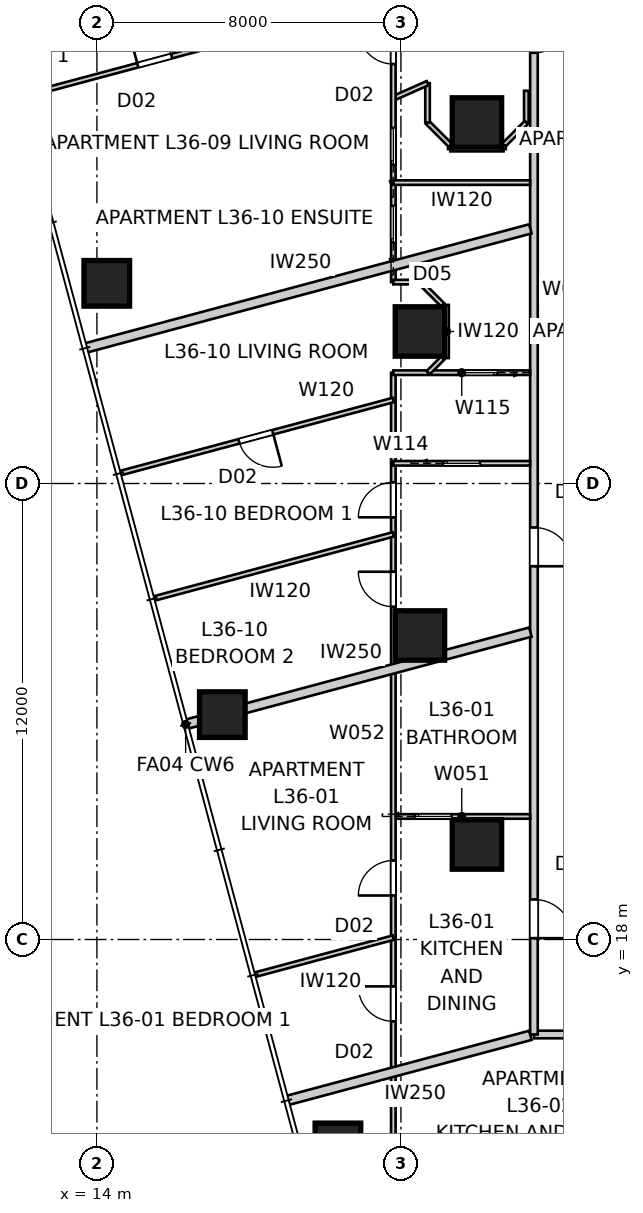
"""IFC4 building model, lengths in metres.
Left out: names, types, materials, properties, quantities, classifications, styles, units other than length and angle.
Written with IfcOpenShell. Run it as: python <this file> out.ifc"""

import sys

from ifc_helpers import new_model, si_unit, direction, frame, frame_2d, origin, origin_2d, place, context, subcontext, project, spatial, rectangle, extrude, element, fill, save


model = new_model("IFC4")
c1 = context("Model", 3, precision=1e-05, world=origin(), true_north=direction((0.0, 1.0)))
c2 = subcontext(c1, "Body", "Model", "MODEL_VIEW")
j1 = project(units=[si_unit("LENGTHUNIT", "METRE"), si_unit("PLANEANGLEUNIT", "RADIAN")], contexts=[c1])
p1 = place(None, origin())
s1 = spatial("IfcSite", under=j1, at=p1, CompositionType="ELEMENT")
p2 = place(p1, origin())
s2 = spatial("IfcBuilding", under=s1, at=p2, CompositionType="ELEMENT")
p3 = place(p2, frame((0.0, 0.0, 132.0)))
s3 = spatial("IfcBuildingStorey", under=s2, at=p3, CompositionType="ELEMENT", Elevation=132.0)
for number, where, z_axis, x_axis in (
    (1, (14.26, 35.267, 0.0), (0.0, 0.0, 1.0), (1.0, 0.0, 0.0)),
    (2, (17.301, 23.918, 0.0), (0.0, 0.0, 1.0), (1.0, 0.0, 0.0)),
    (3, (20.342, 12.568, 0.0), (0.0, 0.0, 1.0), (1.0, 0.0, 0.0)),
):
    element("IfcColumn", number, at=place(p3, frame(where, z_axis=z_axis, x_axis=x_axis)), inside=s3, PredefinedType="COLUMN", context=c2, shape_type="SweptSolid", body=[
        extrude(rectangle(XDim=1.2, YDim=1.2, at=origin_2d()), origin(), (0.0, 0.0, 1.0), 3.4),
    ])
for number, where, z_axis, x_axis in (
    (4, (24.0, 39.5, 0.0), (0.0, 0.0, 1.0), (1.0, 0.0, 0.0)),
    (5, (22.5, 34.0, 0.0), (0.0, 0.0, 1.0), (1.0, 0.0, 0.0)),
    (6, (22.5, 26.0, 0.0), (0.0, 0.0, 1.0), (1.0, 0.0, 0.0)),
    (7, (24.0, 20.5, 0.0), (0.0, 0.0, 1.0), (1.0, 0.0, 0.0)),
):
    element("IfcColumn", number, at=place(p3, frame(where, z_axis=z_axis, x_axis=x_axis)), inside=s3, PredefinedType="COLUMN", context=c2, shape_type="SweptSolid", body=[
        extrude(rectangle(XDim=1.3, YDim=1.3, at=origin_2d()), origin(), (0.0, 0.0, 1.0), 3.4),
    ])
p4 = place(p3, frame((25.5, 15.5, 0.0), z_axis=(0.0, 0.0, 1.0), x_axis=(1.0, 0.0, 0.0)))
e8 = element("IfcWall", 8, at=p4, inside=s3, PredefinedType="PARTITIONING", context=c2, shape_type="SweptSolid", body=[
    extrude(rectangle(XDim=29.0, YDim=0.2, at=frame_2d((14.5, 0.0))), origin(), (0.0, 0.0, 1.0), 3.25),
])
p5 = place(p4, frame((24.996, 0.0, 0.0)))
e9 = element("IfcOpeningElement", 9, at=p5, cuts=e8, PredefinedType="OPENING", context=c2, shape_type="SweptSolid", body=[
    extrude(rectangle(XDim=1.02, YDim=2.1, at=frame_2d((0.51, 1.05))), frame((0.0, 0.11, 0.0), z_axis=(0.0, -1.0, 0.0), x_axis=(1.0, 0.0, 0.0)), (0.0, 0.0, 1.0), 0.22),
])
p6 = place(p4, frame((1.761, 0.0, 0.0)))
e10 = element("IfcOpeningElement", 10, at=p6, cuts=e8, PredefinedType="OPENING", context=c2, shape_type="SweptSolid", body=[
    extrude(rectangle(XDim=1.02, YDim=2.34, at=frame_2d((0.51, 1.17))), frame((0.0, 0.11, 0.0), z_axis=(0.0, -1.0, 0.0), x_axis=(1.0, 0.0, 0.0)), (0.0, 0.0, 1.0), 0.22),
])
p7 = place(p3, frame((25.5, 43.7, 0.0), z_axis=(0.0, 0.0, 1.0), x_axis=(0.0, -1.0, 0.0)))
e11 = element("IfcWall", 11, at=p7, inside=s3, PredefinedType="PARTITIONING", context=c2, shape_type="SweptSolid", body=[
    extrude(rectangle(XDim=28.2, YDim=0.2, at=frame_2d((14.1, 0.0))), origin(), (0.0, 0.0, 1.0), 3.25),
])
p8 = place(p7, frame((24.646, 0.0, 0.0)))
e12 = element("IfcOpeningElement", 12, at=p8, cuts=e11, PredefinedType="OPENING", context=c2, shape_type="SweptSolid", body=[
    extrude(rectangle(XDim=1.02, YDim=2.1, at=frame_2d((0.51, 1.05))), frame((0.0, 0.11, 0.0), z_axis=(0.0, -1.0, 0.0), x_axis=(1.0, 0.0, 0.0)), (0.0, 0.0, 1.0), 0.22),
])
p9 = place(p7, frame((14.858, 0.0, 0.0)))
e13 = element("IfcOpeningElement", 13, at=p9, cuts=e11, PredefinedType="OPENING", context=c2, shape_type="SweptSolid", body=[
    extrude(rectangle(XDim=1.02, YDim=2.34, at=frame_2d((0.51, 1.17))), frame((0.0, 0.11, 0.0), z_axis=(0.0, -1.0, 0.0), x_axis=(1.0, 0.0, 0.0)), (0.0, 0.0, 1.0), 0.22),
])
p10 = place(p7, frame((1.347, 0.0, 0.0)))
e14 = element("IfcOpeningElement", 14, at=p10, cuts=e11, PredefinedType="OPENING", context=c2, shape_type="SweptSolid", body=[
    extrude(rectangle(XDim=1.02, YDim=2.1, at=frame_2d((0.51, 1.05))), frame((0.0, 0.11, 0.0), z_axis=(0.0, -1.0, 0.0), x_axis=(1.0, 0.0, 0.0)), (0.0, 0.0, 1.0), 0.22),
])
p11 = place(p3, frame((16.335, 23.659, 0.0), z_axis=(0.0, 0.0, 1.0), x_axis=(0.965927049013, 0.258814481793, 0.0)))
e15 = element("IfcWall", 15, at=p11, inside=s3, PredefinedType="PARTITIONING", context=c2, shape_type="SweptSolid", body=[
    extrude(rectangle(XDim=9.392, YDim=0.25, at=frame_2d((4.696, 0.0))), origin(), (0.0, 0.0, 1.0), 3.25),
])
p12 = place(p3, frame((13.682, 33.56, 0.0), z_axis=(0.0, 0.0, 1.0), x_axis=(0.965924438766, 0.258824223352, 0.0)))
e16 = element("IfcWall", 16, at=p12, inside=s3, PredefinedType="PARTITIONING", context=c2, shape_type="SweptSolid", body=[
    extrude(rectangle(XDim=12.138, YDim=0.25, at=frame_2d((6.069, 0.0))), origin(), (0.0, 0.0, 1.0), 3.25),
])
p13 = place(p3, frame((18.988, 13.758, 0.0), z_axis=(0.0, 0.0, 1.0), x_axis=(0.965929355837, 0.25880587229, 0.0)))
e17 = element("IfcWall", 17, at=p13, inside=s3, PredefinedType="PARTITIONING", context=c2, shape_type="SweptSolid", body=[
    extrude(rectangle(XDim=6.645, YDim=0.25, at=frame_2d((3.322, 0.0))), origin(), (0.0, 0.0, 1.0), 3.25),
])
p14 = place(p3, frame((21.8, 21.238, 0.0), z_axis=(0.0, 0.0, 1.0), x_axis=(1.0, 0.0, 0.0)))
e18 = element("IfcWall", 18, at=p14, inside=s3, PredefinedType="PARTITIONING", context=c2, shape_type="SweptSolid", body=[
    extrude(rectangle(XDim=3.6, YDim=0.12, at=frame_2d((1.8, 0.0))), origin(), (0.0, 0.0, 1.0), 2.796),
])
p15 = place(p14, frame((0.57, 0.0, 0.0)))
e19 = element("IfcOpeningElement", 19, at=p15, cuts=e18, PredefinedType="OPENING", context=c2, shape_type="SweptSolid", body=[
    extrude(rectangle(XDim=0.96, YDim=2.1, at=frame_2d((0.48, 1.05))), frame((0.0, 0.07, 0.0), z_axis=(0.0, -1.0, 0.0), x_axis=(1.0, 0.0, 0.0)), (0.0, 0.0, 1.0), 0.14),
])
p16 = place(p3, frame((21.8, 11.8, 0.0), z_axis=(0.0, 0.0, 1.0), x_axis=(0.0, 1.0, 0.0)))
e20 = element("IfcWall", 20, at=p16, inside=s3, PredefinedType="PARTITIONING", context=c2, shape_type="SweptSolid", body=[
    extrude(rectangle(XDim=21.116, YDim=0.12, at=frame_2d((10.558, 0.0))), origin(), (0.0, 0.0, 1.0), 3.25),
])
p17 = place(p16, frame((4.046, 0.0, 0.0)))
e21 = element("IfcOpeningElement", 21, at=p17, cuts=e20, PredefinedType="OPENING", context=c2, shape_type="SweptSolid", body=[
    extrude(rectangle(XDim=0.92, YDim=2.34, at=frame_2d((0.46, 1.17))), frame((0.0, 0.07, 0.0), z_axis=(0.0, -1.0, 0.0), x_axis=(1.0, 0.0, 0.0)), (0.0, 0.0, 1.0), 0.14),
])
p18 = place(p16, frame((7.358, 0.0, 0.0)))
e22 = element("IfcOpeningElement", 22, at=p18, cuts=e20, PredefinedType="OPENING", context=c2, shape_type="SweptSolid", body=[
    extrude(rectangle(XDim=0.92, YDim=2.34, at=frame_2d((0.46, 1.17))), frame((0.0, 0.07, 0.0), z_axis=(0.0, -1.0, 0.0), x_axis=(1.0, 0.0, 0.0)), (0.0, 0.0, 1.0), 0.14),
])
p19 = place(p16, frame((14.958, 0.0, 0.0)))
e23 = element("IfcOpeningElement", 23, at=p19, cuts=e20, PredefinedType="OPENING", context=c2, shape_type="SweptSolid", body=[
    extrude(rectangle(XDim=0.92, YDim=2.34, at=frame_2d((0.46, 1.17))), frame((0.0, 0.07, 0.0), z_axis=(0.0, -1.0, 0.0), x_axis=(1.0, 0.0, 0.0)), (0.0, 0.0, 1.0), 0.14),
])
p20 = place(p16, frame((17.31, 0.0, 0.0)))
e24 = element("IfcOpeningElement", 24, at=p20, cuts=e20, PredefinedType="OPENING", context=c2, shape_type="SweptSolid", body=[
    extrude(rectangle(XDim=0.92, YDim=2.34, at=frame_2d((0.46, 1.17))), frame((0.0, 0.07, 0.0), z_axis=(0.0, -1.0, 0.0), x_axis=(1.0, 0.0, 0.0)), (0.0, 0.0, 1.0), 0.14),
])
p21 = place(p3, frame((21.8, 18.049, 0.0), z_axis=(0.0, 0.0, 1.0), x_axis=(-0.965936829447, -0.258777977267, 0.0)))
e25 = element("IfcWall", 25, at=p21, inside=s3, PredefinedType="PARTITIONING", context=c2, shape_type="SweptSolid", body=[
    extrude(rectangle(XDim=3.787, YDim=0.12, at=frame_2d((1.894, 0.0))), origin(), (0.0, 0.0, 1.0), 3.25),
])
p22 = place(p3, frame((25.3, 40.335, 0.0), z_axis=(0.0, 0.0, 1.0), x_axis=(0.0, -1.0, 0.0)))
e26 = element("IfcWall", 26, at=p22, inside=s3, PredefinedType="PARTITIONING", context=c2, shape_type="SweptSolid", body=[
    extrude(rectangle(XDim=0.835, YDim=0.12, at=frame_2d((0.417, 0.0))), origin(), (0.0, 0.0, 1.0), 3.25),
])
p23 = place(p3, frame((25.3, 39.5, 0.0), z_axis=(0.0, 0.0, 1.0), x_axis=(-0.707106781187, -0.707106781187, 0.0)))
e27 = element("IfcWall", 27, at=p23, inside=s3, PredefinedType="PARTITIONING", context=c2, shape_type="SweptSolid", body=[
    extrude(rectangle(XDim=0.849, YDim=0.12, at=frame_2d((0.424, 0.0))), origin(), (0.0, 0.0, 1.0), 3.25),
])
p24 = place(p3, frame((24.7, 38.8, 0.0), z_axis=(0.0, 0.0, 1.0), x_axis=(-1.0, 0.0, 0.0)))
e28 = element("IfcWall", 28, at=p24, inside=s3, PredefinedType="PARTITIONING", context=c2, shape_type="SweptSolid", body=[
    extrude(rectangle(XDim=1.4, YDim=0.12, at=frame_2d((0.7, 0.0))), origin(), (0.0, 0.0, 1.0), 2.796),
])
p25 = place(p3, frame((23.3, 38.9, 0.0), z_axis=(0.0, 0.0, 1.0), x_axis=(-0.707106781187, 0.707106781187, 0.0)))
e29 = element("IfcWall", 29, at=p25, inside=s3, PredefinedType="PARTITIONING", context=c2, shape_type="SweptSolid", body=[
    extrude(rectangle(XDim=0.849, YDim=0.12, at=frame_2d((0.424, 0.0))), origin(), (0.0, 0.0, 1.0), 3.25),
])
p26 = place(p3, frame((22.7, 39.5, 0.0), z_axis=(0.0, 0.0, 1.0), x_axis=(0.0, 1.0, 0.0)))
e30 = element("IfcWall", 30, at=p26, inside=s3, PredefinedType="PARTITIONING", context=c2, shape_type="SweptSolid", body=[
    extrude(rectangle(XDim=1.035, YDim=0.12, at=frame_2d((0.518, 0.0))), origin(), (0.0, 0.0, 1.0), 3.25),
])
p27 = place(p3, frame((22.7, 40.535, 0.0), z_axis=(0.0, 0.0, 1.0), x_axis=(-0.913739977195, -0.406299463544, 0.0)))
e31 = element("IfcWall", 31, at=p27, inside=s3, PredefinedType="PARTITIONING", context=c2, shape_type="SweptSolid", body=[
    extrude(rectangle(XDim=0.985, YDim=0.12, at=frame_2d((0.492, 0.0))), origin(), (0.0, 0.0, 1.0), 3.25),
])
p28 = place(p3, frame((21.8, 35.3, 0.0), z_axis=(0.0, 0.0, 1.0), x_axis=(0.0, 1.0, 0.0)))
e32 = element("IfcWall", 32, at=p28, inside=s3, PredefinedType="PARTITIONING", context=c2, shape_type="SweptSolid", body=[
    extrude(rectangle(XDim=12.45, YDim=0.12, at=frame_2d((6.225, 0.0))), origin(), (0.0, 0.0, 1.0), 2.637),
])
p29 = place(p28, frame((5.738, 0.0, 0.0)))
e33 = element("IfcOpeningElement", 33, at=p29, cuts=e32, PredefinedType="OPENING", context=c2, shape_type="SweptSolid", body=[
    extrude(rectangle(XDim=0.92, YDim=2.34, at=frame_2d((0.46, 1.17))), frame((0.0, 0.07, 0.0), z_axis=(0.0, -1.0, 0.0), x_axis=(1.0, 0.0, 0.0)), (0.0, 0.0, 1.0), 0.14),
])
p30 = place(p28, frame((8.275, 0.0, 0.0)))
e34 = element("IfcOpeningElement", 34, at=p30, cuts=e32, PredefinedType="OPENING", context=c2, shape_type="SweptSolid", body=[
    extrude(rectangle(XDim=0.92, YDim=2.34, at=frame_2d((0.46, 1.17))), frame((0.0, 0.07, 0.0), z_axis=(0.0, -1.0, 0.0), x_axis=(1.0, 0.0, 0.0)), (0.0, 0.0, 1.0), 0.14),
])
p31 = place(p28, frame((3.097, 0.0, 0.0)))
e35 = element("IfcOpeningElement", 35, at=p31, cuts=e32, PredefinedType="OPENING", context=c2, shape_type="SweptSolid", body=[
    extrude(rectangle(XDim=0.96, YDim=2.1, at=frame_2d((0.48, 1.05))), frame((0.0, 0.07, 0.0), z_axis=(0.0, -1.0, 0.0), x_axis=(1.0, 0.0, 0.0)), (0.0, 0.0, 1.0), 0.14),
])
p32 = place(p28, frame((1.047, 0.0, 0.0)))
e36 = element("IfcOpeningElement", 36, at=p32, cuts=e32, PredefinedType="OPENING", context=c2, shape_type="SweptSolid", body=[
    extrude(rectangle(XDim=0.96, YDim=2.1, at=frame_2d((0.48, 1.05))), frame((0.0, 0.07, 0.0), z_axis=(0.0, -1.0, 0.0), x_axis=(1.0, 0.0, 0.0)), (0.0, 0.0, 1.0), 0.14),
])
p33 = place(p3, frame((25.4, 37.918, 0.0), z_axis=(0.0, 0.0, 1.0), x_axis=(-1.0, 0.0, 0.0)))
e37 = element("IfcWall", 37, at=p33, inside=s3, PredefinedType="PARTITIONING", context=c2, shape_type="SweptSolid", body=[
    extrude(rectangle(XDim=3.6, YDim=0.12, at=frame_2d((1.8, 0.0))), origin(), (0.0, 0.0, 1.0), 3.25),
])
p34 = place(p3, frame((11.952, 40.17, 0.0), z_axis=(0.0, 0.0, 1.0), x_axis=(0.965923039694, 0.258829444594, 0.0)))
e38 = element("IfcWall", 38, at=p34, inside=s3, PredefinedType="PARTITIONING", context=c2, shape_type="SweptSolid", body=[
    extrude(rectangle(XDim=10.196, YDim=0.12, at=frame_2d((5.098, 0.0))), origin(), (0.0, 0.0, 1.0), 3.25),
])
p35 = place(p34, frame((3.233, 0.0, 0.0)))
e39 = element("IfcOpeningElement", 39, at=p35, cuts=e38, PredefinedType="OPENING", context=c2, shape_type="SweptSolid", body=[
    extrude(rectangle(XDim=0.92, YDim=2.34, at=frame_2d((0.46, 1.17))), frame((0.0, 0.07, 0.0), z_axis=(0.0, -1.0, 0.0), x_axis=(1.0, 0.0, 0.0)), (0.0, 0.0, 1.0), 0.14),
])
p36 = place(p3, frame((21.8, 30.531, 0.0), z_axis=(0.0, 0.0, 1.0), x_axis=(1.0, 0.0, 0.0)))
e40 = element("IfcWall", 40, at=p36, inside=s3, PredefinedType="PARTITIONING", context=c2, shape_type="SweptSolid", body=[
    extrude(rectangle(XDim=3.6, YDim=0.12, at=frame_2d((1.8, 0.0))), origin(), (0.0, 0.0, 1.0), 3.25),
])
p37 = place(p36, frame((1.32, 0.0, 0.0)))
e41 = element("IfcOpeningElement", 41, at=p37, cuts=e40, PredefinedType="OPENING", context=c2, shape_type="SweptSolid", body=[
    extrude(rectangle(XDim=0.96, YDim=2.1, at=frame_2d((0.48, 1.05))), frame((0.0, 0.07, 0.0), z_axis=(0.0, -1.0, 0.0), x_axis=(1.0, 0.0, 0.0)), (0.0, 0.0, 1.0), 0.14),
])
p38 = place(p3, frame((25.4, 32.916, 0.0), z_axis=(0.0, 0.0, 1.0), x_axis=(-1.0, 0.0, 0.0)))
e42 = element("IfcWall", 42, at=p38, inside=s3, PredefinedType="PARTITIONING", context=c2, shape_type="SweptSolid", body=[
    extrude(rectangle(XDim=3.6, YDim=0.12, at=frame_2d((1.8, 0.0))), origin(), (0.0, 0.0, 1.0), 2.796),
])
p39 = place(p38, frame((0.862, 0.0, 0.0)))
e43 = element("IfcOpeningElement", 43, at=p39, cuts=e42, PredefinedType="OPENING", context=c2, shape_type="SweptSolid", body=[
    extrude(rectangle(XDim=0.96, YDim=2.1, at=frame_2d((0.48, 1.05))), frame((0.0, 0.07, 0.0), z_axis=(0.0, -1.0, 0.0), x_axis=(1.0, 0.0, 0.0)), (0.0, 0.0, 1.0), 0.14),
])
p40 = place(p3, frame((22.716, 32.916, 0.0), z_axis=(0.0, 0.0, 1.0), x_axis=(0.707106781187, 0.707106781187, 0.0)))
e44 = element("IfcWall", 44, at=p40, inside=s3, PredefinedType="PARTITIONING", context=c2, shape_type="SweptSolid", body=[
    extrude(rectangle(XDim=0.543, YDim=0.12, at=frame_2d((0.271, 0.0))), origin(), (0.0, 0.0, 1.0), 3.25),
])
p41 = place(p3, frame((23.2, 33.3, 0.0), z_axis=(0.0, 0.0, 1.0), x_axis=(0.0, 1.0, 0.0)))
e45 = element("IfcWall", 45, at=p41, inside=s3, PredefinedType="PARTITIONING", context=c2, shape_type="SweptSolid", body=[
    extrude(rectangle(XDim=1.4, YDim=0.12, at=frame_2d((0.7, 0.0))), origin(), (0.0, 0.0, 1.0), 3.25),
])
p42 = place(p3, frame((23.1, 34.7, 0.0), z_axis=(0.0, 0.0, 1.0), x_axis=(-0.707106781187, 0.707106781187, 0.0)))
e46 = element("IfcWall", 46, at=p42, inside=s3, PredefinedType="PARTITIONING", context=c2, shape_type="SweptSolid", body=[
    extrude(rectangle(XDim=0.849, YDim=0.12, at=frame_2d((0.424, 0.0))), origin(), (0.0, 0.0, 1.0), 3.25),
])
p43 = place(p3, frame((22.5, 35.3, 0.0), z_axis=(0.0, 0.0, 1.0), x_axis=(-1.0, 0.0, 0.0)))
e47 = element("IfcWall", 47, at=p43, inside=s3, PredefinedType="PARTITIONING", context=c2, shape_type="SweptSolid", body=[
    extrude(rectangle(XDim=0.7, YDim=0.12, at=frame_2d((0.35, 0.0))), origin(), (0.0, 0.0, 1.0), 2.721),
])
p44 = place(p3, frame((21.8, 32.198, 0.0), z_axis=(0.0, 0.0, 1.0), x_axis=(-0.965923619242, -0.258827281774, 0.0)))
e48 = element("IfcWall", 48, at=p44, inside=s3, PredefinedType="PARTITIONING", context=c2, shape_type="SweptSolid", body=[
    extrude(rectangle(XDim=7.449, YDim=0.12, at=frame_2d((3.725, 0.0))), origin(), (0.0, 0.0, 1.0), 3.25),
])
p45 = place(p44, frame((3.284, 0.0, 0.0)))
e49 = element("IfcOpeningElement", 49, at=p45, cuts=e48, PredefinedType="OPENING", context=c2, shape_type="SweptSolid", body=[
    extrude(rectangle(XDim=0.92, YDim=2.34, at=frame_2d((0.46, 1.17))), frame((0.0, 0.07, 0.0), z_axis=(0.0, -1.0, 0.0), x_axis=(1.0, 0.0, 0.0)), (0.0, 0.0, 1.0), 0.14),
])
p46 = place(p3, frame((21.8, 28.661, 0.0), z_axis=(0.0, 0.0, 1.0), x_axis=(-0.96591852682, -0.258846285554, 0.0)))
e50 = element("IfcWall", 50, at=p46, inside=s3, PredefinedType="PARTITIONING", context=c2, shape_type="SweptSolid", body=[
    extrude(rectangle(XDim=6.533, YDim=0.12, at=frame_2d((3.267, 0.0))), origin(), (0.0, 0.0, 1.0), 3.25),
])
for number, where, z_axis, x_axis in (
    (51, (24.7, 38.8, 0.0), (0.0, 0.0, 1.0), (0.0, 1.0, 0.0)),
    (52, (23.3, 38.8, 0.0), (0.0, 0.0, 1.0), (0.0, 1.0, 0.0)),
):
    element("IfcWall", number, at=place(p3, frame(where, z_axis=z_axis, x_axis=x_axis)), inside=s3, PredefinedType="PARTITIONING", context=c2, shape_type="SweptSolid", body=[
        extrude(rectangle(XDim=0.1, YDim=0.12, at=frame_2d((0.05, 0.0))), origin(), (0.0, 0.0, 1.0), 3.25),
    ])
p47 = place(p8, origin())
e53 = element("IfcDoor", 53, at=p47, inside=s3, OperationType="SINGLE_SWING_RIGHT", PredefinedType="DOOR", context=c2, shape_type="SweptSolid", body=[
    extrude(rectangle(XDim=1.02, YDim=2.1, at=frame_2d((0.51, 1.05))), frame((0.0, 0.025, 0.0), z_axis=(0.0, -1.0, 0.0), x_axis=(1.0, 0.0, 0.0)), (0.0, 0.0, 1.0), 0.05),
])
fill(e12, e53)
p48 = place(p9, origin())
e54 = element("IfcDoor", 54, at=p48, inside=s3, OperationType="SINGLE_SWING_RIGHT", PredefinedType="DOOR", context=c2, shape_type="SweptSolid", body=[
    extrude(rectangle(XDim=1.02, YDim=2.34, at=frame_2d((0.51, 1.17))), frame((0.0, 0.025, 0.0), z_axis=(0.0, -1.0, 0.0), x_axis=(1.0, 0.0, 0.0)), (0.0, 0.0, 1.0), 0.05),
])
fill(e13, e54)
p49 = place(p10, origin())
e55 = element("IfcDoor", 55, at=p49, inside=s3, OperationType="SINGLE_SWING_LEFT", PredefinedType="DOOR", context=c2, shape_type="SweptSolid", body=[
    extrude(rectangle(XDim=1.02, YDim=2.1, at=frame_2d((0.51, 1.05))), frame((0.0, 0.025, 0.0), z_axis=(0.0, -1.0, 0.0), x_axis=(1.0, 0.0, 0.0)), (0.0, 0.0, 1.0), 0.05),
])
fill(e14, e55)
p50 = place(p15, origin())
e56 = element("IfcDoor", 56, at=p50, inside=s3, OperationType="SLIDING_TO_LEFT", PredefinedType="DOOR", context=c2, shape_type="SweptSolid", body=[
    extrude(rectangle(XDim=0.96, YDim=2.1, at=frame_2d((0.48, 1.05))), frame((0.0, 0.025, 0.0), z_axis=(0.0, -1.0, 0.0), x_axis=(1.0, 0.0, 0.0)), (0.0, 0.0, 1.0), 0.05),
])
fill(e19, e56)
p51 = place(p17, origin())
e57 = element("IfcDoor", 57, at=p51, inside=s3, OperationType="SINGLE_SWING_RIGHT", PredefinedType="DOOR", context=c2, shape_type="SweptSolid", body=[
    extrude(rectangle(XDim=0.92, YDim=2.34, at=frame_2d((0.46, 1.17))), frame((0.0, 0.025, 0.0), z_axis=(0.0, -1.0, 0.0), x_axis=(1.0, 0.0, 0.0)), (0.0, 0.0, 1.0), 0.05),
])
fill(e21, e57)
p52 = place(p18, origin())
e58 = element("IfcDoor", 58, at=p52, inside=s3, OperationType="SINGLE_SWING_LEFT", PredefinedType="DOOR", context=c2, shape_type="SweptSolid", body=[
    extrude(rectangle(XDim=0.92, YDim=2.34, at=frame_2d((0.46, 1.17))), frame((0.0, 0.025, 0.0), z_axis=(0.0, -1.0, 0.0), x_axis=(1.0, 0.0, 0.0)), (0.0, 0.0, 1.0), 0.05),
])
fill(e22, e58)
p53 = place(p37, origin())
e59 = element("IfcDoor", 59, at=p53, inside=s3, OperationType="SLIDING_TO_LEFT", PredefinedType="DOOR", context=c2, shape_type="SweptSolid", body=[
    extrude(rectangle(XDim=0.96, YDim=2.1, at=frame_2d((0.48, 1.05))), frame((0.0, 0.025, 0.0), z_axis=(0.0, -1.0, 0.0), x_axis=(1.0, 0.0, 0.0)), (0.0, 0.0, 1.0), 0.05),
])
fill(e41, e59)
p54 = place(p19, origin())
e60 = element("IfcDoor", 60, at=p54, inside=s3, OperationType="SINGLE_SWING_RIGHT", PredefinedType="DOOR", context=c2, shape_type="SweptSolid", body=[
    extrude(rectangle(XDim=0.92, YDim=2.34, at=frame_2d((0.46, 1.17))), frame((0.0, 0.025, 0.0), z_axis=(0.0, -1.0, 0.0), x_axis=(1.0, 0.0, 0.0)), (0.0, 0.0, 1.0), 0.05),
])
fill(e23, e60)
p55 = place(p20, origin())
e61 = element("IfcDoor", 61, at=p55, inside=s3, OperationType="SINGLE_SWING_LEFT", PredefinedType="DOOR", context=c2, shape_type="SweptSolid", body=[
    extrude(rectangle(XDim=0.92, YDim=2.34, at=frame_2d((0.46, 1.17))), frame((0.0, 0.025, 0.0), z_axis=(0.0, -1.0, 0.0), x_axis=(1.0, 0.0, 0.0)), (0.0, 0.0, 1.0), 0.05),
])
fill(e24, e61)
p56 = place(p29, origin())
e62 = element("IfcDoor", 62, at=p56, inside=s3, OperationType="SINGLE_SWING_RIGHT", PredefinedType="DOOR", context=c2, shape_type="SweptSolid", body=[
    extrude(rectangle(XDim=0.92, YDim=2.34, at=frame_2d((0.46, 1.17))), frame((0.0, 0.025, 0.0), z_axis=(0.0, -1.0, 0.0), x_axis=(1.0, 0.0, 0.0)), (0.0, 0.0, 1.0), 0.05),
])
fill(e33, e62)
p57 = place(p39, origin())
e63 = element("IfcDoor", 63, at=p57, inside=s3, OperationType="SLIDING_TO_LEFT", PredefinedType="DOOR", context=c2, shape_type="SweptSolid", body=[
    extrude(rectangle(XDim=0.96, YDim=2.1, at=frame_2d((0.48, 1.05))), frame((0.0, 0.025, 0.0), z_axis=(0.0, -1.0, 0.0), x_axis=(1.0, 0.0, 0.0)), (0.0, 0.0, 1.0), 0.05),
])
fill(e43, e63)
p58 = place(p35, origin())
e64 = element("IfcDoor", 64, at=p58, inside=s3, OperationType="SINGLE_SWING_LEFT", PredefinedType="DOOR", context=c2, shape_type="SweptSolid", body=[
    extrude(rectangle(XDim=0.92, YDim=2.34, at=frame_2d((0.46, 1.17))), frame((0.0, 0.025, 0.0), z_axis=(0.0, -1.0, 0.0), x_axis=(1.0, 0.0, 0.0)), (0.0, 0.0, 1.0), 0.05),
])
fill(e39, e64)
p59 = place(p31, origin())
e65 = element("IfcDoor", 65, at=p59, inside=s3, OperationType="SLIDING_TO_LEFT", PredefinedType="DOOR", context=c2, shape_type="SweptSolid", body=[
    extrude(rectangle(XDim=0.96, YDim=2.1, at=frame_2d((0.48, 1.05))), frame((0.0, 0.025, 0.0), z_axis=(0.0, -1.0, 0.0), x_axis=(1.0, 0.0, 0.0)), (0.0, 0.0, 1.0), 0.05),
])
fill(e35, e65)
p60 = place(p32, origin())
e66 = element("IfcDoor", 66, at=p60, inside=s3, OperationType="SLIDING_TO_LEFT", PredefinedType="DOOR", context=c2, shape_type="SweptSolid", body=[
    extrude(rectangle(XDim=0.96, YDim=2.1, at=frame_2d((0.48, 1.05))), frame((0.0, 0.025, 0.0), z_axis=(0.0, -1.0, 0.0), x_axis=(1.0, 0.0, 0.0)), (0.0, 0.0, 1.0), 0.05),
])
fill(e36, e66)
p61 = place(p45, origin())
e67 = element("IfcDoor", 67, at=p61, inside=s3, OperationType="SINGLE_SWING_LEFT", PredefinedType="DOOR", context=c2, shape_type="SweptSolid", body=[
    extrude(rectangle(XDim=0.92, YDim=2.34, at=frame_2d((0.46, 1.17))), frame((0.0, 0.025, 0.0), z_axis=(0.0, -1.0, 0.0), x_axis=(1.0, 0.0, 0.0)), (0.0, 0.0, 1.0), 0.05),
])
fill(e49, e67)
save(model, sys.argv[1])
